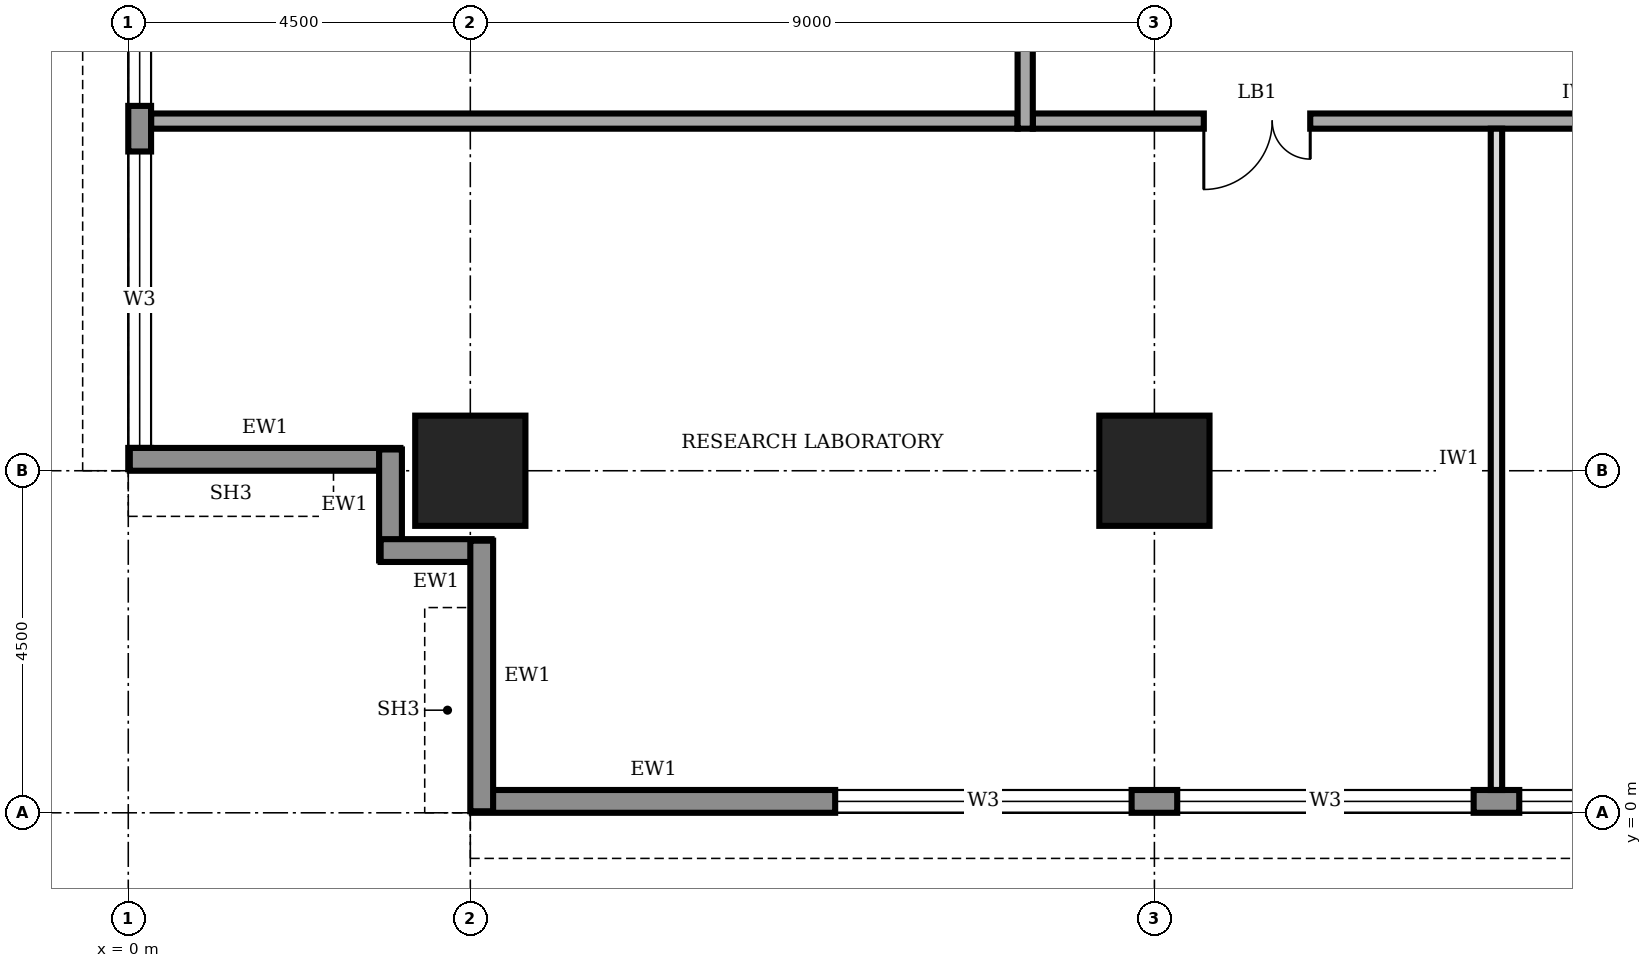
"""IFC4 building model, lengths in metres.
Left out: names, types, materials, properties, quantities, classifications, styles, units other than length and angle.
Written with IfcOpenShell. Run it as: python <this file> out.ifc"""

import sys

from ifc_helpers import new_model, si_unit, direction, frame, frame_2d, origin, origin_2d, place, context, subcontext, project, spatial, rectangle, extrude, element, fill, save


model = new_model("IFC4")
c1 = context("Model", 3, precision=1e-05, world=origin(), true_north=direction((0.0, 1.0)))
c2 = subcontext(c1, "Body", "Model", "MODEL_VIEW")
j1 = project(units=[si_unit("LENGTHUNIT", "METRE"), si_unit("PLANEANGLEUNIT", "RADIAN")], contexts=[c1])
p1 = place(None, origin())
s1 = spatial("IfcSite", under=j1, at=p1, CompositionType="ELEMENT")
p2 = place(p1, origin())
s2 = spatial("IfcBuilding", under=s1, at=p2, CompositionType="ELEMENT")
p3 = place(p2, frame((0.0, 0.0, 261.0)))
s3 = spatial("IfcBuildingStorey", under=s2, at=p3, CompositionType="ELEMENT", Elevation=261.0)
for number, where, z_axis, x_axis in (
    (1, (4.5, 4.5, 0.0), (0.0, 0.0, 1.0), (1.0, 0.0, 0.0)),
    (2, (13.5, 4.5, 0.0), (0.0, 0.0, 1.0), (1.0, 0.0, 0.0)),
):
    element("IfcColumn", number, at=place(p3, frame(where, z_axis=z_axis, x_axis=x_axis)), inside=s3, PredefinedType="COLUMN", context=c2, shape_type="SweptSolid", body=[
        extrude(rectangle(XDim=1.45, YDim=1.45, at=origin_2d()), origin(), (0.0, 0.0, 1.0), 4.0),
    ])
p4 = place(p3, frame((4.52, 0.15, 0.0), z_axis=(0.0, 0.0, 1.0), x_axis=(1.0, 0.0, 0.0)))
e3 = element("IfcWall", 3, at=p4, inside=s3, PredefinedType="STANDARD", context=c2, shape_type="SweptSolid", body=[
    extrude(rectangle(XDim=31.46, YDim=0.3, at=frame_2d((15.73, 0.0))), origin(), (0.0, 0.0, 1.0), 3.75),
])
p5 = place(p4, frame((4.78, 0.0, 0.95)))
e4 = element("IfcOpeningElement", 4, at=p5, cuts=e3, PredefinedType="OPENING", context=c2, shape_type="SweptSolid", body=[
    extrude(rectangle(XDim=3.9, YDim=1.8, at=frame_2d((1.95, 0.9))), frame((0.0, 0.16, 0.0), z_axis=(0.0, -1.0, 0.0), x_axis=(1.0, 0.0, 0.0)), (0.0, 0.0, 1.0), 0.32),
])
p6 = place(p4, frame((9.28, 0.0, 0.95)))
e5 = element("IfcOpeningElement", 5, at=p6, cuts=e3, PredefinedType="OPENING", context=c2, shape_type="SweptSolid", body=[
    extrude(rectangle(XDim=3.9, YDim=1.8, at=frame_2d((1.95, 0.9))), frame((0.0, 0.16, 0.0), z_axis=(0.0, -1.0, 0.0), x_axis=(1.0, 0.0, 0.0)), (0.0, 0.0, 1.0), 0.32),
])
p7 = place(p4, frame((13.78, 0.0, 0.95)))
e6 = element("IfcOpeningElement", 6, at=p7, cuts=e3, PredefinedType="OPENING", context=c2, shape_type="SweptSolid", body=[
    extrude(rectangle(XDim=3.9, YDim=1.8, at=frame_2d((1.95, 0.9))), frame((0.0, 0.16, 0.0), z_axis=(0.0, -1.0, 0.0), x_axis=(1.0, 0.0, 0.0)), (0.0, 0.0, 1.0), 0.32),
])
p8 = place(p4, frame((18.28, 0.0, 0.95)))
e7 = element("IfcOpeningElement", 7, at=p8, cuts=e3, PredefinedType="OPENING", context=c2, shape_type="SweptSolid", body=[
    extrude(rectangle(XDim=3.9, YDim=1.8, at=frame_2d((1.95, 0.9))), frame((0.0, 0.16, 0.0), z_axis=(0.0, -1.0, 0.0), x_axis=(1.0, 0.0, 0.0)), (0.0, 0.0, 1.0), 0.32),
])
p9 = place(p4, frame((22.78, 0.0, 0.95)))
e8 = element("IfcOpeningElement", 8, at=p9, cuts=e3, PredefinedType="OPENING", context=c2, shape_type="SweptSolid", body=[
    extrude(rectangle(XDim=3.9, YDim=1.8, at=frame_2d((1.95, 0.9))), frame((0.0, 0.16, 0.0), z_axis=(0.0, -1.0, 0.0), x_axis=(1.0, 0.0, 0.0)), (0.0, 0.0, 1.0), 0.32),
])
p10 = place(p4, frame((27.28, 0.0, 0.95)))
e9 = element("IfcOpeningElement", 9, at=p10, cuts=e3, PredefinedType="OPENING", context=c2, shape_type="SweptSolid", body=[
    extrude(rectangle(XDim=3.9, YDim=1.8, at=frame_2d((1.95, 0.9))), frame((0.0, 0.16, 0.0), z_axis=(0.0, -1.0, 0.0), x_axis=(1.0, 0.0, 0.0)), (0.0, 0.0, 1.0), 0.32),
])
p11 = place(p3, frame((0.15, 35.98, 0.0), z_axis=(0.0, 0.0, 1.0), x_axis=(0.0, -1.0, 0.0)))
e10 = element("IfcWall", 10, at=p11, inside=s3, PredefinedType="STANDARD", context=c2, shape_type="SweptSolid", body=[
    extrude(rectangle(XDim=31.46, YDim=0.3, at=frame_2d((15.73, 0.0))), origin(), (0.0, 0.0, 1.0), 3.75),
])
p12 = place(p11, frame((27.28, 0.0, 0.95)))
e11 = element("IfcOpeningElement", 11, at=p12, cuts=e10, PredefinedType="OPENING", context=c2, shape_type="SweptSolid", body=[
    extrude(rectangle(XDim=3.9, YDim=1.8, at=frame_2d((1.95, 0.9))), frame((0.0, 0.16, 0.0), z_axis=(0.0, -1.0, 0.0), x_axis=(1.0, 0.0, 0.0)), (0.0, 0.0, 1.0), 0.32),
])
p13 = place(p11, frame((22.78, 0.0, 0.95)))
e12 = element("IfcOpeningElement", 12, at=p13, cuts=e10, PredefinedType="OPENING", context=c2, shape_type="SweptSolid", body=[
    extrude(rectangle(XDim=3.9, YDim=1.8, at=frame_2d((1.95, 0.9))), frame((0.0, 0.16, 0.0), z_axis=(0.0, -1.0, 0.0), x_axis=(1.0, 0.0, 0.0)), (0.0, 0.0, 1.0), 0.32),
])
p14 = place(p11, frame((18.28, 0.0, 0.95)))
e13 = element("IfcOpeningElement", 13, at=p14, cuts=e10, PredefinedType="OPENING", context=c2, shape_type="SweptSolid", body=[
    extrude(rectangle(XDim=3.9, YDim=1.8, at=frame_2d((1.95, 0.9))), frame((0.0, 0.16, 0.0), z_axis=(0.0, -1.0, 0.0), x_axis=(1.0, 0.0, 0.0)), (0.0, 0.0, 1.0), 0.32),
])
p15 = place(p11, frame((13.78, 0.0, 0.95)))
e14 = element("IfcOpeningElement", 14, at=p15, cuts=e10, PredefinedType="OPENING", context=c2, shape_type="SweptSolid", body=[
    extrude(rectangle(XDim=3.9, YDim=1.8, at=frame_2d((1.95, 0.9))), frame((0.0, 0.16, 0.0), z_axis=(0.0, -1.0, 0.0), x_axis=(1.0, 0.0, 0.0)), (0.0, 0.0, 1.0), 0.32),
])
p16 = place(p11, frame((9.28, 0.0, 0.95)))
e15 = element("IfcOpeningElement", 15, at=p16, cuts=e10, PredefinedType="OPENING", context=c2, shape_type="SweptSolid", body=[
    extrude(rectangle(XDim=3.9, YDim=1.8, at=frame_2d((1.95, 0.9))), frame((0.0, 0.16, 0.0), z_axis=(0.0, -1.0, 0.0), x_axis=(1.0, 0.0, 0.0)), (0.0, 0.0, 1.0), 0.32),
])
p17 = place(p11, frame((4.78, 0.0, 0.95)))
e16 = element("IfcOpeningElement", 16, at=p17, cuts=e10, PredefinedType="OPENING", context=c2, shape_type="SweptSolid", body=[
    extrude(rectangle(XDim=3.9, YDim=1.8, at=frame_2d((1.95, 0.9))), frame((0.0, 0.16, 0.0), z_axis=(0.0, -1.0, 0.0), x_axis=(1.0, 0.0, 0.0)), (0.0, 0.0, 1.0), 0.32),
])
p18 = place(p3, frame((0.02, 4.65, 0.0), z_axis=(0.0, 0.0, 1.0), x_axis=(1.0, 0.0, 0.0)))
e17 = element("IfcWall", 17, at=p18, inside=s3, PredefinedType="STANDARD", context=c2, shape_type="SweptSolid", body=[
    extrude(rectangle(XDim=3.56, YDim=0.3, at=frame_2d((1.78, 0.0))), origin(), (0.0, 0.0, 1.0), 2.85),
])
for number, where, z_axis, x_axis in (
    (18, (3.45, 4.78, 0.0), (0.0, 0.0, 1.0), (0.0, -1.0, 0.0)),
    (19, (3.32, 3.45, 0.0), (0.0, 0.0, 1.0), (1.0, 0.0, 0.0)),
):
    element("IfcWall", number, at=place(p3, frame(where, z_axis=z_axis, x_axis=x_axis)), inside=s3, PredefinedType="STANDARD", context=c2, shape_type="SweptSolid", body=[
        extrude(rectangle(XDim=1.46, YDim=0.3, at=frame_2d((0.73, 0.0))), origin(), (0.0, 0.0, 1.0), 3.75),
    ])
p19 = place(p3, frame((4.65, 3.58, 0.0), z_axis=(0.0, 0.0, 1.0), x_axis=(0.0, -1.0, 0.0)))
e20 = element("IfcWall", 20, at=p19, inside=s3, PredefinedType="STANDARD", context=c2, shape_type="SweptSolid", body=[
    extrude(rectangle(XDim=3.56, YDim=0.3, at=frame_2d((1.78, 0.0))), origin(), (0.0, 0.0, 1.0), 2.85),
])
p20 = place(p3, frame((11.9, 9.1, 0.0), z_axis=(0.0, 0.0, 1.0), x_axis=(1.0, 0.0, 0.0)))
e21 = element("IfcWall", 21, at=p20, inside=s3, PredefinedType="SOLIDWALL", context=c2, shape_type="SweptSolid", body=[
    extrude(rectangle(XDim=16.9, YDim=0.2, at=frame_2d((8.45, 0.0))), origin(), (0.0, 0.0, 1.0), 3.75),
])
p21 = place(p20, frame((2.25, 0.0, 0.0)))
e22 = element("IfcOpeningElement", 22, at=p21, cuts=e21, PredefinedType="OPENING", context=c2, shape_type="SweptSolid", body=[
    extrude(rectangle(XDim=1.4, YDim=2.1, at=frame_2d((0.7, 1.05))), frame((0.0, 0.11, 0.0), z_axis=(0.0, -1.0, 0.0), x_axis=(1.0, 0.0, 0.0)), (0.0, 0.0, 1.0), 0.22),
])
p22 = place(p20, frame((10.8, 0.0, 0.0)))
e23 = element("IfcOpeningElement", 23, at=p22, cuts=e21, PredefinedType="OPENING", context=c2, shape_type="SweptSolid", body=[
    extrude(rectangle(XDim=1.4, YDim=2.1, at=frame_2d((0.7, 1.05))), frame((0.0, 0.11, 0.0), z_axis=(0.0, -1.0, 0.0), x_axis=(1.0, 0.0, 0.0)), (0.0, 0.0, 1.0), 0.22),
])
p23 = place(p3, frame((11.8, 31.3, 0.0), z_axis=(0.0, 0.0, 1.0), x_axis=(0.0, -1.0, 0.0)))
e24 = element("IfcWall", 24, at=p23, inside=s3, PredefinedType="SOLIDWALL", context=c2, shape_type="SweptSolid", body=[
    extrude(rectangle(XDim=22.3, YDim=0.2, at=frame_2d((11.15, 0.0))), origin(), (0.0, 0.0, 1.0), 3.75),
])
p24 = place(p23, frame((19.55, 0.0, 0.0)))
e25 = element("IfcOpeningElement", 25, at=p24, cuts=e24, PredefinedType="OPENING", context=c2, shape_type="SweptSolid", body=[
    extrude(rectangle(XDim=1.0, YDim=2.1, at=frame_2d((0.5, 1.05))), frame((0.0, 0.11, 0.0), z_axis=(0.0, -1.0, 0.0), x_axis=(1.0, 0.0, 0.0)), (0.0, 0.0, 1.0), 0.22),
])
p25 = place(p23, frame((16.2, 0.0, 0.0)))
e26 = element("IfcOpeningElement", 26, at=p25, cuts=e24, PredefinedType="OPENING", context=c2, shape_type="SweptSolid", body=[
    extrude(rectangle(XDim=1.0, YDim=2.1, at=frame_2d((0.5, 1.05))), frame((0.0, 0.11, 0.0), z_axis=(0.0, -1.0, 0.0), x_axis=(1.0, 0.0, 0.0)), (0.0, 0.0, 1.0), 0.22),
])
p26 = place(p23, frame((13.2, 0.0, 0.0)))
e27 = element("IfcOpeningElement", 27, at=p26, cuts=e24, PredefinedType="OPENING", context=c2, shape_type="SweptSolid", body=[
    extrude(rectangle(XDim=0.9, YDim=2.1, at=frame_2d((0.45, 1.05))), frame((0.0, 0.11, 0.0), z_axis=(0.0, -1.0, 0.0), x_axis=(1.0, 0.0, 0.0)), (0.0, 0.0, 1.0), 0.22),
])
p27 = place(p23, frame((10.15, 0.0, 0.0)))
e28 = element("IfcOpeningElement", 28, at=p27, cuts=e24, PredefinedType="OPENING", context=c2, shape_type="SweptSolid", body=[
    extrude(rectangle(XDim=0.9, YDim=2.1, at=frame_2d((0.45, 1.05))), frame((0.0, 0.11, 0.0), z_axis=(0.0, -1.0, 0.0), x_axis=(1.0, 0.0, 0.0)), (0.0, 0.0, 1.0), 0.22),
])
p28 = place(p23, frame((5.45, 0.0, 0.0)))
e29 = element("IfcOpeningElement", 29, at=p28, cuts=e24, PredefinedType="OPENING", context=c2, shape_type="SweptSolid", body=[
    extrude(rectangle(XDim=0.9, YDim=2.1, at=frame_2d((0.45, 1.05))), frame((0.0, 0.11, 0.0), z_axis=(0.0, -1.0, 0.0), x_axis=(1.0, 0.0, 0.0)), (0.0, 0.0, 1.0), 0.22),
])
p29 = place(p23, frame((8.0, 0.0, 0.0)))
e30 = element("IfcOpeningElement", 30, at=p29, cuts=e24, PredefinedType="OPENING", context=c2, shape_type="SweptSolid", body=[
    extrude(rectangle(XDim=1.0, YDim=2.1, at=frame_2d((0.5, 1.05))), frame((0.0, 0.11, 0.0), z_axis=(0.0, -1.0, 0.0), x_axis=(1.0, 0.0, 0.0)), (0.0, 0.0, 1.0), 0.22),
])
p30 = place(p23, frame((1.55, 0.0, 0.0)))
e31 = element("IfcOpeningElement", 31, at=p30, cuts=e24, PredefinedType="OPENING", context=c2, shape_type="SweptSolid", body=[
    extrude(rectangle(XDim=1.0, YDim=2.1, at=frame_2d((0.5, 1.05))), frame((0.0, 0.11, 0.0), z_axis=(0.0, -1.0, 0.0), x_axis=(1.0, 0.0, 0.0)), (0.0, 0.0, 1.0), 0.22),
])
p31 = place(p3, frame((0.3, 9.1, 0.0), z_axis=(0.0, 0.0, 1.0), x_axis=(1.0, 0.0, 0.0)))
e32 = element("IfcWall", 32, at=p31, inside=s3, PredefinedType="SOLIDWALL", context=c2, shape_type="SweptSolid", body=[
    extrude(rectangle(XDim=11.4, YDim=0.2, at=frame_2d((5.7, 0.0))), origin(), (0.0, 0.0, 1.0), 3.75),
])
p32 = place(p3, frame((18.0, 0.3, 0.0), z_axis=(0.0, 0.0, 1.0), x_axis=(0.0, 1.0, 0.0)))
e33 = element("IfcWall", 33, at=p32, inside=s3, PredefinedType="PARTITIONING", context=c2, shape_type="SweptSolid", body=[
    extrude(rectangle(XDim=8.7, YDim=0.15, at=frame_2d((4.35, 0.0))), origin(), (0.0, 0.0, 1.0), 3.75),
])
p33 = place(p5, origin())
e34 = element("IfcWindow", 34, at=p33, inside=s3, PartitioningType="SINGLE_PANEL", PredefinedType="WINDOW", context=c2, shape_type="SweptSolid", body=[
    extrude(rectangle(XDim=3.9, YDim=1.8, at=frame_2d((1.95, 0.9))), frame((0.0, 0.03, 0.0), z_axis=(0.0, -1.0, 0.0), x_axis=(1.0, 0.0, 0.0)), (0.0, 0.0, 1.0), 0.06),
])
fill(e4, e34)
p34 = place(p6, origin())
e35 = element("IfcWindow", 35, at=p34, inside=s3, PartitioningType="SINGLE_PANEL", PredefinedType="WINDOW", context=c2, shape_type="SweptSolid", body=[
    extrude(rectangle(XDim=3.9, YDim=1.8, at=frame_2d((1.95, 0.9))), frame((0.0, 0.03, 0.0), z_axis=(0.0, -1.0, 0.0), x_axis=(1.0, 0.0, 0.0)), (0.0, 0.0, 1.0), 0.06),
])
fill(e5, e35)
p35 = place(p7, origin())
e36 = element("IfcWindow", 36, at=p35, inside=s3, PartitioningType="SINGLE_PANEL", PredefinedType="WINDOW", context=c2, shape_type="SweptSolid", body=[
    extrude(rectangle(XDim=3.9, YDim=1.8, at=frame_2d((1.95, 0.9))), frame((0.0, 0.03, 0.0), z_axis=(0.0, -1.0, 0.0), x_axis=(1.0, 0.0, 0.0)), (0.0, 0.0, 1.0), 0.06),
])
fill(e6, e36)
p36 = place(p12, origin())
e37 = element("IfcWindow", 37, at=p36, inside=s3, PartitioningType="SINGLE_PANEL", PredefinedType="WINDOW", context=c2, shape_type="SweptSolid", body=[
    extrude(rectangle(XDim=3.9, YDim=1.8, at=frame_2d((1.95, 0.9))), frame((0.0, 0.03, 0.0), z_axis=(0.0, -1.0, 0.0), x_axis=(1.0, 0.0, 0.0)), (0.0, 0.0, 1.0), 0.06),
])
fill(e11, e37)
p37 = place(p13, origin())
e38 = element("IfcWindow", 38, at=p37, inside=s3, PartitioningType="SINGLE_PANEL", PredefinedType="WINDOW", context=c2, shape_type="SweptSolid", body=[
    extrude(rectangle(XDim=3.9, YDim=1.8, at=frame_2d((1.95, 0.9))), frame((0.0, 0.03, 0.0), z_axis=(0.0, -1.0, 0.0), x_axis=(1.0, 0.0, 0.0)), (0.0, 0.0, 1.0), 0.06),
])
fill(e12, e38)
p38 = place(p21, frame((1.4, 0.0, 0.0), z_axis=(0.0, 0.0, 1.0), x_axis=(-1.0, 0.0, 0.0)))
e39 = element("IfcDoor", 39, at=p38, inside=s3, OperationType="DOUBLE_DOOR_SINGLE_SWING", PredefinedType="DOOR", context=c2, shape_type="SweptSolid", body=[
    extrude(rectangle(XDim=1.4, YDim=2.1, at=frame_2d((0.7, 1.05))), frame((0.0, 0.025, 0.0), z_axis=(0.0, -1.0, 0.0), x_axis=(1.0, 0.0, 0.0)), (0.0, 0.0, 1.0), 0.05),
])
fill(e22, e39)
save(model, sys.argv[1])
